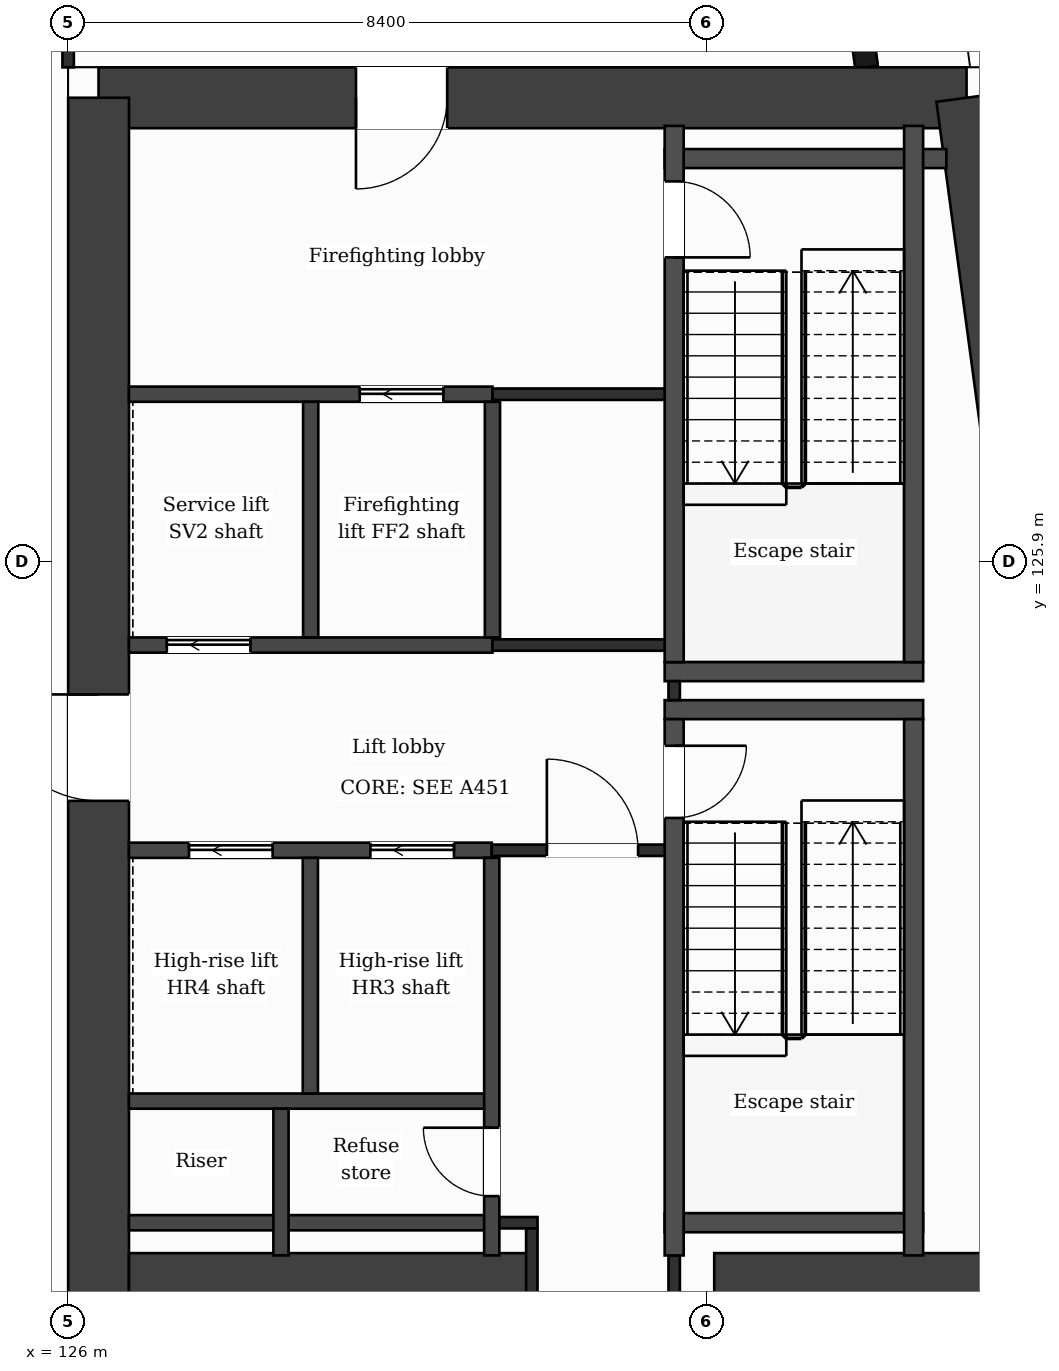
"""IFC4 building model, lengths in metres.
Left out: names, types, materials, properties, quantities, classifications, styles, units other than length and angle.
Written with IfcOpenShell. Run it as: python <this file> out.ifc"""

import sys

from ifc_helpers import new_model, si_unit, direction, frame, frame_2d, origin, place, context, subcontext, project, spatial, rectangle, extrude, element, fill, save


model = new_model("IFC4")
c1 = context("Model", 3, precision=1e-05, world=origin(), true_north=direction((0.0, 1.0)))
c2 = subcontext(c1, "Body", "Model", "MODEL_VIEW")
j1 = project(units=[si_unit("LENGTHUNIT", "METRE"), si_unit("PLANEANGLEUNIT", "RADIAN")], contexts=[c1])
p1 = place(None, origin())
s1 = spatial("IfcSite", under=j1, at=p1, CompositionType="ELEMENT")
p2 = place(p1, origin())
s2 = spatial("IfcBuilding", under=s1, at=p2, CompositionType="ELEMENT")
p3 = place(p2, frame((0.0, 0.0, 209.6)))
s3 = spatial("IfcBuildingStorey", under=s2, at=p3, CompositionType="ELEMENT", Elevation=209.6)
p4 = place(p3, frame((126.4, 132.0, 0.0), z_axis=(0.0, 0.0, 1.0), x_axis=(1.0, 0.0, 0.0)))
e1 = element("IfcWall", 1, at=p4, inside=s3, PredefinedType="SHEAR", context=c2, shape_type="SweptSolid", body=[
    extrude(rectangle(XDim=11.42, YDim=0.8, at=frame_2d((5.71, 0.0))), origin(), (0.0, 0.0, 1.0), 3.7),
])
p5 = place(p4, frame((3.386, 0.0, 0.0)))
e2 = element("IfcOpeningElement", 2, at=p5, cuts=e1, PredefinedType="OPENING", context=c2, shape_type="SweptSolid", body=[
    extrude(rectangle(XDim=1.2, YDim=2.1, at=frame_2d((0.6, 1.05))), frame((0.0, 0.41, 0.0), z_axis=(0.0, -1.0, 0.0), x_axis=(1.0, 0.0, 0.0)), (0.0, 0.0, 1.0), 0.82),
])
p6 = place(p3, frame((137.82, 132.0, 0.0), z_axis=(0.0, 0.0, 1.0), x_axis=(0.133408347329, -0.991061154956, 0.0)))
e3 = element("IfcWall", 3, at=p6, inside=s3, PredefinedType="SHEAR", context=c2, shape_type="SweptSolid", body=[
    extrude(rectangle(XDim=21.391, YDim=0.8, at=frame_2d((10.696, 0.0))), origin(), (0.0, 0.0, 1.0), 3.7),
])
p7 = place(p3, frame((126.4, 110.8, 0.0), z_axis=(0.0, 0.0, 1.0), x_axis=(0.0, 1.0, 0.0)))
e4 = element("IfcWall", 4, at=p7, inside=s3, PredefinedType="SHEAR", context=c2, shape_type="SweptSolid", body=[
    extrude(rectangle(XDim=21.2, YDim=0.8, at=frame_2d((10.6, 0.0))), origin(), (0.0, 0.0, 1.0), 3.7),
])
p8 = place(p7, frame((11.95, 0.0, 0.0)))
e5 = element("IfcOpeningElement", 5, at=p8, cuts=e4, PredefinedType="OPENING", context=c2, shape_type="SweptSolid", body=[
    extrude(rectangle(XDim=1.4, YDim=2.1, at=frame_2d((0.7, 1.05))), frame((0.0, 0.41, 0.0), z_axis=(0.0, -1.0, 0.0), x_axis=(1.0, 0.0, 0.0)), (0.0, 0.0, 1.0), 0.82),
])
p9 = place(p3, frame((126.8, 116.4, 0.0), z_axis=(0.0, 0.0, 1.0), x_axis=(1.0, 0.0, 0.0)))
e6 = element("IfcWall", 6, at=p9, inside=s3, PredefinedType="SHEAR", context=c2, shape_type="SweptSolid", body=[
    extrude(rectangle(XDim=5.3, YDim=0.8, at=frame_2d((2.65, 0.0))), origin(), (0.0, 0.0, 1.0), 3.7),
])
p10 = place(p3, frame((134.5, 116.4, 0.0), z_axis=(0.0, 0.0, 1.0), x_axis=(1.0, 0.0, 0.0)))
e7 = element("IfcWall", 7, at=p10, inside=s3, PredefinedType="SHEAR", context=c2, shape_type="SweptSolid", body=[
    extrude(rectangle(XDim=5.077, YDim=0.8, at=frame_2d((2.539, 0.0))), origin(), (0.0, 0.0, 1.0), 3.7),
])
p11 = place(p3, frame((136.504, 132.4, 0.0), z_axis=(0.0, 0.0, 1.0), x_axis=(-0.133399697462, 0.99106231929, 0.0)))
e8 = element("IfcWall", 8, at=p11, inside=s3, PredefinedType="SOLIDWALL", context=c2, shape_type="SweptSolid", body=[
    extrude(rectangle(XDim=6.74, YDim=0.3, at=frame_2d((3.37, 0.0))), origin(), (0.0, 0.0, 1.0), 3.38),
])
p12 = place(p11, frame((1.115, 0.0, 0.0)))
e9 = element("IfcOpeningElement", 9, at=p12, cuts=e8, PredefinedType="OPENING", context=c2, shape_type="SweptSolid", body=[
    extrude(rectangle(XDim=1.2, YDim=2.4, at=frame_2d((0.6, 1.2))), frame((0.0, 0.16, 0.0), z_axis=(0.0, -1.0, 0.0), x_axis=(1.0, 0.0, 0.0)), (0.0, 0.0, 1.0), 0.32),
])
p13 = place(p11, frame((3.835, 0.0, 0.9)))
e10 = element("IfcOpeningElement", 10, at=p13, cuts=e8, PredefinedType="OPENING", context=c2, shape_type="SweptSolid", body=[
    extrude(rectangle(XDim=2.4, YDim=2.1, at=frame_2d((1.2, 1.05))), frame((0.0, 0.16, 0.0), z_axis=(0.0, -1.0, 0.0), x_axis=(1.0, 0.0, 0.0)), (0.0, 0.0, 1.0), 0.32),
])
p14 = place(p3, frame((126.8, 117.2, 0.0), z_axis=(0.0, 0.0, 1.0), x_axis=(1.0, 0.0, 0.0)))
e11 = element("IfcWall", 11, at=p14, inside=s3, PredefinedType="PARTITIONING", context=c2, shape_type="SweptSolid", body=[
    extrude(rectangle(XDim=4.773, YDim=0.2, at=frame_2d((2.386, 0.0))), origin(), (0.0, 0.0, 1.0), 3.38),
])
p15 = place(p3, frame((131.573, 117.2, 0.0), z_axis=(0.0, 0.0, 1.0), x_axis=(1.0, 0.0, 0.0)))
e12 = element("IfcWall", 12, at=p15, inside=s3, PredefinedType="PARTITIONING", context=c2, shape_type="SweptSolid", body=[
    extrude(rectangle(XDim=0.602, YDim=0.15, at=frame_2d((0.301, 0.0))), origin(), (0.0, 0.0, 1.0), 3.38),
])
p16 = place(p3, frame((133.848, 117.2, 0.0), z_axis=(0.0, 0.0, 1.0), x_axis=(1.0, 0.0, 0.0)))
e13 = element("IfcWall", 13, at=p16, inside=s3, PredefinedType="PARTITIONING", context=c2, shape_type="SweptSolid", body=[
    extrude(rectangle(XDim=3.4, YDim=0.25, at=frame_2d((1.7, 0.0))), origin(), (0.0, 0.0, 1.0), 3.38),
])
p17 = place(p3, frame((126.8, 118.8, 0.0), z_axis=(0.0, 0.0, 1.0), x_axis=(1.0, 0.0, 0.0)))
e14 = element("IfcWall", 14, at=p17, inside=s3, PredefinedType="PARTITIONING", context=c2, shape_type="SweptSolid", body=[
    extrude(rectangle(XDim=4.773, YDim=0.2, at=frame_2d((2.386, 0.0))), origin(), (0.0, 0.0, 1.0), 3.38),
])
p18 = place(p3, frame((126.8, 122.1, 0.0), z_axis=(0.0, 0.0, 1.0), x_axis=(1.0, 0.0, 0.0)))
e15 = element("IfcWall", 15, at=p18, inside=s3, PredefinedType="PARTITIONING", context=c2, shape_type="SweptSolid", body=[
    extrude(rectangle(XDim=4.773, YDim=0.2, at=frame_2d((2.386, 0.0))), origin(), (0.0, 0.0, 1.0), 3.38),
])
p19 = place(p18, frame((3.176, 0.0, 0.0)))
e16 = element("IfcOpeningElement", 16, at=p19, cuts=e15, PredefinedType="OPENING", context=c2, shape_type="SweptSolid", body=[
    extrude(rectangle(XDim=1.1, YDim=2.1, at=frame_2d((0.55, 1.05))), frame((0.0, 0.11, 0.0), z_axis=(0.0, -1.0, 0.0), x_axis=(1.0, 0.0, 0.0)), (0.0, 0.0, 1.0), 0.22),
])
p20 = place(p18, frame((0.79, 0.0, 0.0)))
e17 = element("IfcOpeningElement", 17, at=p20, cuts=e15, PredefinedType="OPENING", context=c2, shape_type="SweptSolid", body=[
    extrude(rectangle(XDim=1.1, YDim=2.1, at=frame_2d((0.55, 1.05))), frame((0.0, 0.11, 0.0), z_axis=(0.0, -1.0, 0.0), x_axis=(1.0, 0.0, 0.0)), (0.0, 0.0, 1.0), 0.22),
])
p21 = place(p3, frame((131.573, 122.1, 0.0), z_axis=(0.0, 0.0, 1.0), x_axis=(1.0, 0.0, 0.0)))
e18 = element("IfcWall", 18, at=p21, inside=s3, PredefinedType="PARTITIONING", context=c2, shape_type="SweptSolid", body=[
    extrude(rectangle(XDim=2.4, YDim=0.15, at=frame_2d((1.2, 0.0))), origin(), (0.0, 0.0, 1.0), 3.38),
])
p22 = place(p21, frame((0.725, 0.0, 0.0)))
e19 = element("IfcOpeningElement", 19, at=p22, cuts=e18, PredefinedType="OPENING", context=c2, shape_type="SweptSolid", body=[
    extrude(rectangle(XDim=1.2, YDim=2.1, at=frame_2d((0.6, 1.05))), frame((0.0, 0.085, 0.0), z_axis=(0.0, -1.0, 0.0), x_axis=(1.0, 0.0, 0.0)), (0.0, 0.0, 1.0), 0.17),
])
for number, where, z_axis, x_axis in (
    (20, (133.848, 123.95, 0.0), (0.0, 0.0, 1.0), (1.0, 0.0, 0.0)),
    (21, (133.848, 124.45, 0.0), (0.0, 0.0, 1.0), (1.0, 0.0, 0.0)),
):
    element("IfcWall", number, at=place(p3, frame(where, z_axis=z_axis, x_axis=x_axis)), inside=s3, PredefinedType="PARTITIONING", context=c2, shape_type="SweptSolid", body=[
        extrude(rectangle(XDim=3.4, YDim=0.25, at=frame_2d((1.7, 0.0))), origin(), (0.0, 0.0, 1.0), 3.38),
    ])
p23 = place(p3, frame((126.8, 124.8, 0.0), z_axis=(0.0, 0.0, 1.0), x_axis=(1.0, 0.0, 0.0)))
e22 = element("IfcWall", 22, at=p23, inside=s3, PredefinedType="PARTITIONING", context=c2, shape_type="SweptSolid", body=[
    extrude(rectangle(XDim=4.782, YDim=0.2, at=frame_2d((2.391, 0.0))), origin(), (0.0, 0.0, 1.0), 3.38),
])
p24 = place(p23, frame((0.498, 0.0, 0.0)))
e23 = element("IfcOpeningElement", 23, at=p24, cuts=e22, PredefinedType="OPENING", context=c2, shape_type="SweptSolid", body=[
    extrude(rectangle(XDim=1.1, YDim=2.1, at=frame_2d((0.55, 1.05))), frame((0.0, 0.11, 0.0), z_axis=(0.0, -1.0, 0.0), x_axis=(1.0, 0.0, 0.0)), (0.0, 0.0, 1.0), 0.22),
])
p25 = place(p3, frame((131.582, 124.8, 0.0), z_axis=(0.0, 0.0, 1.0), x_axis=(1.0, 0.0, 0.0)))
e24 = element("IfcWall", 24, at=p25, inside=s3, PredefinedType="PARTITIONING", context=c2, shape_type="SweptSolid", body=[
    extrude(rectangle(XDim=2.516, YDim=0.15, at=frame_2d((1.258, 0.0))), origin(), (0.0, 0.0, 1.0), 3.38),
])
p26 = place(p3, frame((126.8, 128.1, 0.0), z_axis=(0.0, 0.0, 1.0), x_axis=(1.0, 0.0, 0.0)))
e25 = element("IfcWall", 25, at=p26, inside=s3, PredefinedType="PARTITIONING", context=c2, shape_type="SweptSolid", body=[
    extrude(rectangle(XDim=4.782, YDim=0.2, at=frame_2d((2.391, 0.0))), origin(), (0.0, 0.0, 1.0), 3.38),
])
p27 = place(p26, frame((3.036, 0.0, 0.0)))
e26 = element("IfcOpeningElement", 26, at=p27, cuts=e25, PredefinedType="OPENING", context=c2, shape_type="SweptSolid", body=[
    extrude(rectangle(XDim=1.1, YDim=2.1, at=frame_2d((0.55, 1.05))), frame((0.0, 0.11, 0.0), z_axis=(0.0, -1.0, 0.0), x_axis=(1.0, 0.0, 0.0)), (0.0, 0.0, 1.0), 0.22),
])
p28 = place(p3, frame((131.582, 128.1, 0.0), z_axis=(0.0, 0.0, 1.0), x_axis=(1.0, 0.0, 0.0)))
e27 = element("IfcWall", 27, at=p28, inside=s3, PredefinedType="PARTITIONING", context=c2, shape_type="SweptSolid", body=[
    extrude(rectangle(XDim=2.391, YDim=0.15, at=frame_2d((1.195, 0.0))), origin(), (0.0, 0.0, 1.0), 3.38),
])
p29 = place(p3, frame((133.848, 131.2, 0.0), z_axis=(0.0, 0.0, 1.0), x_axis=(1.0, 0.0, 0.0)))
e28 = element("IfcWall", 28, at=p29, inside=s3, PredefinedType="PARTITIONING", context=c2, shape_type="SweptSolid", body=[
    extrude(rectangle(XDim=3.706, YDim=0.25, at=frame_2d((1.853, 0.0))), origin(), (0.0, 0.0, 1.0), 3.38),
])
p30 = place(p3, frame((126.0, 132.4, 0.0), z_axis=(0.0, 0.0, 1.0), x_axis=(0.0, 1.0, 0.0)))
e29 = element("IfcWall", 29, at=p30, inside=s3, PredefinedType="PARTITIONING", context=c2, shape_type="SweptSolid", body=[
    extrude(rectangle(XDim=1.325, YDim=0.15, at=frame_2d((0.663, 0.0))), origin(), (0.0, 0.0, 1.0), 3.38),
])
p31 = place(p3, frame((128.8, 116.77, 0.0), z_axis=(0.0, 0.0, 1.0), x_axis=(0.0, 1.0, 0.0)))
e30 = element("IfcWall", 30, at=p31, inside=s3, PredefinedType="PARTITIONING", context=c2, shape_type="SweptSolid", body=[
    extrude(rectangle(XDim=1.93, YDim=0.2, at=frame_2d((0.965, 0.0))), origin(), (0.0, 0.0, 1.0), 3.38),
])
for number, where, z_axis, x_axis in (
    (31, (129.187, 118.9, 0.0), (0.0, 0.0, 1.0), (0.0, 1.0, 0.0)),
    (32, (129.191, 124.9, 0.0), (0.0, 0.0, 1.0), (0.0, 1.0, 0.0)),
):
    element("IfcWall", number, at=place(p3, frame(where, z_axis=z_axis, x_axis=x_axis)), inside=s3, PredefinedType="PARTITIONING", context=c2, shape_type="SweptSolid", body=[
        extrude(rectangle(XDim=3.1, YDim=0.2, at=frame_2d((1.55, 0.0))), origin(), (0.0, 0.0, 1.0), 3.38),
    ])
p32 = place(p3, frame((131.573, 116.77, 0.0), z_axis=(0.0, 0.0, 1.0), x_axis=(0.0, 1.0, 0.0)))
e33 = element("IfcWall", 33, at=p32, inside=s3, PredefinedType="PARTITIONING", context=c2, shape_type="SweptSolid", body=[
    extrude(rectangle(XDim=5.23, YDim=0.2, at=frame_2d((2.615, 0.0))), origin(), (0.0, 0.0, 1.0), 3.38),
])
p33 = place(p32, frame((0.78, 0.0, 0.0)))
e34 = element("IfcOpeningElement", 34, at=p33, cuts=e33, PredefinedType="OPENING", context=c2, shape_type="SweptSolid", body=[
    extrude(rectangle(XDim=0.9, YDim=2.1, at=frame_2d((0.45, 1.05))), frame((0.0, 0.11, 0.0), z_axis=(0.0, -1.0, 0.0), x_axis=(1.0, 0.0, 0.0)), (0.0, 0.0, 1.0), 0.22),
])
p34 = place(p3, frame((131.582, 124.9, 0.0), z_axis=(0.0, 0.0, 1.0), x_axis=(0.0, 1.0, 0.0)))
e35 = element("IfcWall", 35, at=p34, inside=s3, PredefinedType="PARTITIONING", context=c2, shape_type="SweptSolid", body=[
    extrude(rectangle(XDim=3.1, YDim=0.2, at=frame_2d((1.55, 0.0))), origin(), (0.0, 0.0, 1.0), 3.38),
])
p35 = place(p3, frame((132.1, 116.0, 0.0), z_axis=(0.0, 0.0, 1.0), x_axis=(0.0, 1.0, 0.0)))
e36 = element("IfcWall", 36, at=p35, inside=s3, PredefinedType="PARTITIONING", context=c2, shape_type="SweptSolid", body=[
    extrude(rectangle(XDim=1.125, YDim=0.15, at=frame_2d((0.562, 0.0))), origin(), (0.0, 0.0, 1.0), 3.38),
])
p36 = place(p3, frame((133.973, 116.0, 0.0), z_axis=(0.0, 0.0, 1.0), x_axis=(0.0, 1.0, 0.0)))
e37 = element("IfcWall", 37, at=p36, inside=s3, PredefinedType="PARTITIONING", context=c2, shape_type="SweptSolid", body=[
    extrude(rectangle(XDim=0.77, YDim=0.15, at=frame_2d((0.385, 0.0))), origin(), (0.0, 0.0, 1.0), 3.38),
])
p37 = place(p3, frame((133.973, 124.075, 0.0), z_axis=(0.0, 0.0, 1.0), x_axis=(0.0, 1.0, 0.0)))
e38 = element("IfcWall", 38, at=p37, inside=s3, PredefinedType="PARTITIONING", context=c2, shape_type="SweptSolid", body=[
    extrude(rectangle(XDim=0.25, YDim=0.15, at=frame_2d((0.125, 0.0))), origin(), (0.0, 0.0, 1.0), 3.38),
])
p38 = place(p3, frame((133.973, 116.77, 0.0), z_axis=(0.0, 0.0, 1.0), x_axis=(0.0, 1.0, 0.0)))
e39 = element("IfcWall", 39, at=p38, inside=s3, PredefinedType="PARTITIONING", context=c2, shape_type="SweptSolid", body=[
    extrude(rectangle(XDim=7.055, YDim=0.25, at=frame_2d((3.527, 0.0))), origin(), (0.0, 0.0, 1.0), 3.38),
])
p39 = place(p38, frame((5.755, 0.0, 0.0)))
e40 = element("IfcOpeningElement", 40, at=p39, cuts=e39, PredefinedType="OPENING", context=c2, shape_type="SweptSolid", body=[
    extrude(rectangle(XDim=0.95, YDim=2.1, at=frame_2d((0.475, 1.05))), frame((0.0, 0.135, 0.0), z_axis=(0.0, -1.0, 0.0), x_axis=(1.0, 0.0, 0.0)), (0.0, 0.0, 1.0), 0.27),
])
p40 = place(p3, frame((133.973, 124.575, 0.0), z_axis=(0.0, 0.0, 1.0), x_axis=(0.0, 1.0, 0.0)))
e41 = element("IfcWall", 41, at=p40, inside=s3, PredefinedType="PARTITIONING", context=c2, shape_type="SweptSolid", body=[
    extrude(rectangle(XDim=7.055, YDim=0.25, at=frame_2d((3.527, 0.0))), origin(), (0.0, 0.0, 1.0), 3.38),
])
p41 = place(p40, frame((5.325, 0.0, 0.0)))
e42 = element("IfcOpeningElement", 42, at=p41, cuts=e41, PredefinedType="OPENING", context=c2, shape_type="SweptSolid", body=[
    extrude(rectangle(XDim=1.0, YDim=2.1, at=frame_2d((0.5, 1.05))), frame((0.0, 0.135, 0.0), z_axis=(0.0, -1.0, 0.0), x_axis=(1.0, 0.0, 0.0)), (0.0, 0.0, 1.0), 0.27),
])
for number, where, z_axis, x_axis in (
    (43, (137.123, 116.77, 0.0), (0.0, 0.0, 1.0), (0.0, 1.0, 0.0)),
    (44, (137.123, 124.575, 0.0), (0.0, 0.0, 1.0), (0.0, 1.0, 0.0)),
):
    element("IfcWall", number, at=place(p3, frame(where, z_axis=z_axis, x_axis=x_axis)), inside=s3, PredefinedType="PARTITIONING", context=c2, shape_type="SweptSolid", body=[
        extrude(rectangle(XDim=7.055, YDim=0.25, at=frame_2d((3.527, 0.0))), origin(), (0.0, 0.0, 1.0), 3.38),
    ])
p42 = place(p22, origin())
e45 = element("IfcDoor", 45, at=p42, inside=s3, OperationType="SINGLE_SWING_LEFT", PredefinedType="DOOR", context=c2, shape_type="SweptSolid", body=[
    extrude(rectangle(XDim=1.2, YDim=2.1, at=frame_2d((0.6, 1.05))), frame((0.0, 0.025, 0.0), z_axis=(0.0, -1.0, 0.0), x_axis=(1.0, 0.0, 0.0)), (0.0, 0.0, 1.0), 0.05),
])
fill(e19, e45)
p43 = place(p19, origin())
e46 = element("IfcDoor", 46, at=p43, inside=s3, OperationType="SLIDING_TO_LEFT", PredefinedType="DOOR", context=c2, shape_type="SweptSolid", body=[
    extrude(rectangle(XDim=1.1, YDim=2.1, at=frame_2d((0.55, 1.05))), frame((0.0, 0.025, 0.0), z_axis=(0.0, -1.0, 0.0), x_axis=(1.0, 0.0, 0.0)), (0.0, 0.0, 1.0), 0.05),
])
fill(e16, e46)
p44 = place(p20, origin())
e47 = element("IfcDoor", 47, at=p44, inside=s3, OperationType="SLIDING_TO_LEFT", PredefinedType="DOOR", context=c2, shape_type="SweptSolid", body=[
    extrude(rectangle(XDim=1.1, YDim=2.1, at=frame_2d((0.55, 1.05))), frame((0.0, 0.025, 0.0), z_axis=(0.0, -1.0, 0.0), x_axis=(1.0, 0.0, 0.0)), (0.0, 0.0, 1.0), 0.05),
])
fill(e17, e47)
p45 = place(p27, origin())
e48 = element("IfcDoor", 48, at=p45, inside=s3, OperationType="SLIDING_TO_LEFT", PredefinedType="DOOR", context=c2, shape_type="SweptSolid", body=[
    extrude(rectangle(XDim=1.1, YDim=2.1, at=frame_2d((0.55, 1.05))), frame((0.0, 0.025, 0.0), z_axis=(0.0, -1.0, 0.0), x_axis=(1.0, 0.0, 0.0)), (0.0, 0.0, 1.0), 0.05),
])
fill(e26, e48)
p46 = place(p24, origin())
e49 = element("IfcDoor", 49, at=p46, inside=s3, OperationType="SLIDING_TO_LEFT", PredefinedType="DOOR", context=c2, shape_type="SweptSolid", body=[
    extrude(rectangle(XDim=1.1, YDim=2.1, at=frame_2d((0.55, 1.05))), frame((0.0, 0.025, 0.0), z_axis=(0.0, -1.0, 0.0), x_axis=(1.0, 0.0, 0.0)), (0.0, 0.0, 1.0), 0.05),
])
fill(e23, e49)
p47 = place(p39, origin())
e50 = element("IfcDoor", 50, at=p47, inside=s3, OperationType="SINGLE_SWING_RIGHT", PredefinedType="DOOR", context=c2, shape_type="SweptSolid", body=[
    extrude(rectangle(XDim=0.95, YDim=2.1, at=frame_2d((0.475, 1.05))), frame((0.0, 0.025, 0.0), z_axis=(0.0, -1.0, 0.0), x_axis=(1.0, 0.0, 0.0)), (0.0, 0.0, 1.0), 0.05),
])
fill(e40, e50)
p48 = place(p41, origin())
e51 = element("IfcDoor", 51, at=p48, inside=s3, OperationType="SINGLE_SWING_LEFT", PredefinedType="DOOR", context=c2, shape_type="SweptSolid", body=[
    extrude(rectangle(XDim=1.0, YDim=2.1, at=frame_2d((0.5, 1.05))), frame((0.0, 0.025, 0.0), z_axis=(0.0, -1.0, 0.0), x_axis=(1.0, 0.0, 0.0)), (0.0, 0.0, 1.0), 0.05),
])
fill(e42, e51)
p49 = place(p33, origin())
e52 = element("IfcDoor", 52, at=p49, inside=s3, OperationType="SINGLE_SWING_RIGHT", PredefinedType="DOOR", context=c2, shape_type="SweptSolid", body=[
    extrude(rectangle(XDim=0.9, YDim=2.1, at=frame_2d((0.45, 1.05))), frame((0.0, 0.025, 0.0), z_axis=(0.0, -1.0, 0.0), x_axis=(1.0, 0.0, 0.0)), (0.0, 0.0, 1.0), 0.05),
])
fill(e34, e52)
p50 = place(p5, origin())
e53 = element("IfcDoor", 53, at=p50, inside=s3, OperationType="SINGLE_SWING_LEFT", PredefinedType="DOOR", context=c2, shape_type="SweptSolid", body=[
    extrude(rectangle(XDim=1.2, YDim=2.1, at=frame_2d((0.6, 1.05))), frame((0.0, 0.025, 0.0), z_axis=(0.0, -1.0, 0.0), x_axis=(1.0, 0.0, 0.0)), (0.0, 0.0, 1.0), 0.05),
])
fill(e2, e53)
p51 = place(p8, origin())
e54 = element("IfcDoor", 54, at=p51, inside=s3, OperationType="SINGLE_SWING_RIGHT", PredefinedType="DOOR", context=c2, shape_type="SweptSolid", body=[
    extrude(rectangle(XDim=1.4, YDim=2.1, at=frame_2d((0.7, 1.05))), frame((0.0, 0.025, 0.0), z_axis=(0.0, -1.0, 0.0), x_axis=(1.0, 0.0, 0.0)), (0.0, 0.0, 1.0), 0.05),
])
fill(e5, e54)
save(model, sys.argv[1])
